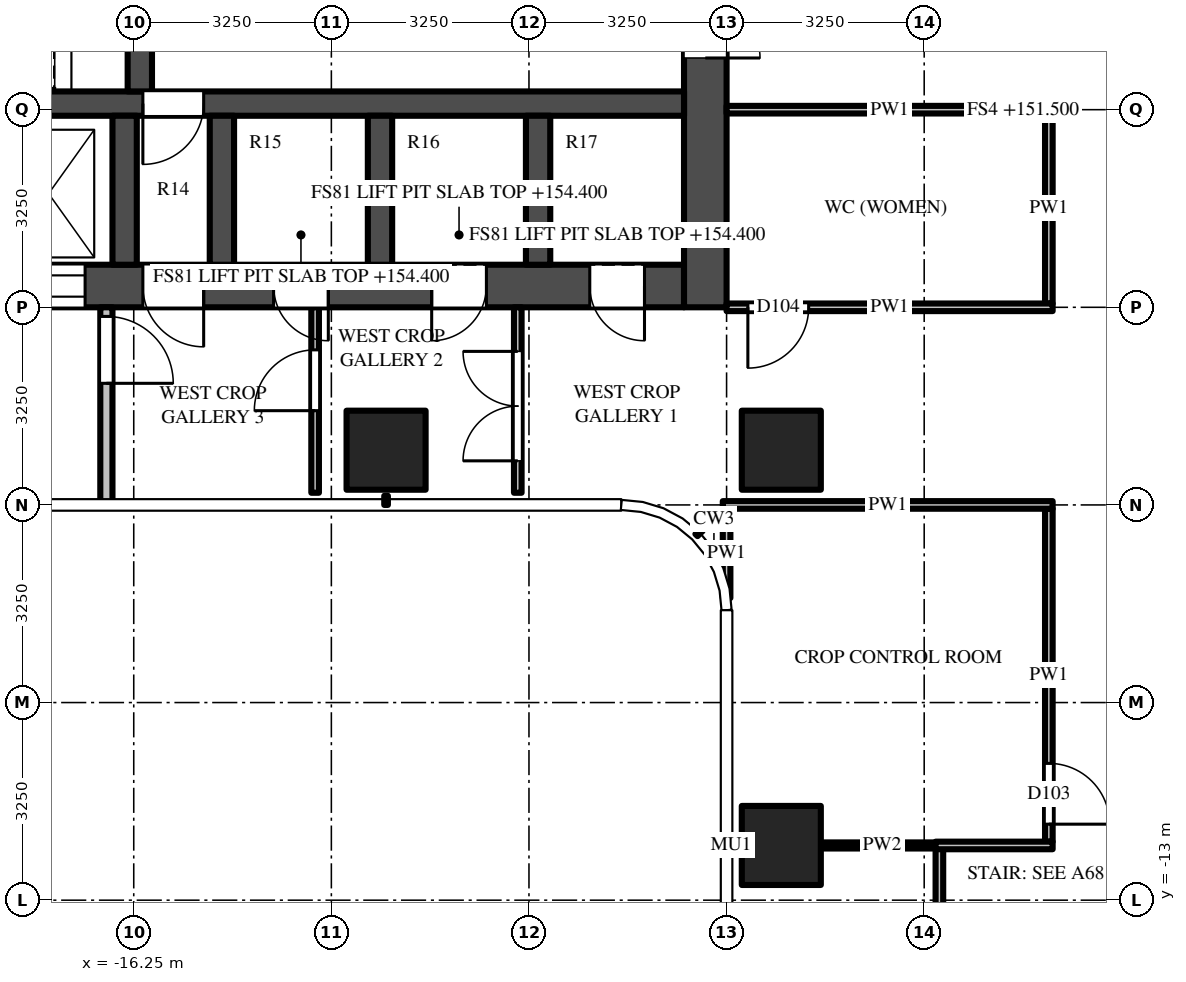
"""IFC4 building model, lengths in metres.
Left out: names, types, materials, properties, quantities, classifications, styles, units other than length and angle.
Written with IfcOpenShell. Run it as: python <this file> out.ifc"""

import sys

from ifc_helpers import new_model, si_unit, direction, frame, frame_2d, origin, origin_2d, place, context, subcontext, project, spatial, rectangle, extrude, source, transform, mapped, element, fill, save


model = new_model("IFC4")
c1 = context("Model", 3, precision=1e-05, world=origin(), true_north=direction((0.0, 1.0)))
c2 = subcontext(c1, "Body", "Model", "MODEL_VIEW")
j1 = project(units=[si_unit("LENGTHUNIT", "METRE"), si_unit("PLANEANGLEUNIT", "RADIAN")], contexts=[c1])
p1 = place(None, origin())
s1 = spatial("IfcSite", under=j1, at=p1, CompositionType="ELEMENT")
p2 = place(p1, origin())
s2 = spatial("IfcBuilding", under=s1, at=p2, CompositionType="ELEMENT")
p3 = place(p2, frame((0.0, 0.0, 151.5)))
s3 = spatial("IfcBuildingStorey", under=s2, at=p3, CompositionType="ELEMENT", Elevation=151.5)
m1 = source(origin(), c2, "Body", "SweptSolid", [
    extrude(rectangle(XDim=1.3, YDim=1.3, at=origin_2d()), origin(), (0.0, 0.0, 1.0), 4.5),
])
for number, where, z_axis, x_axis in (
    (1, (-5.6, -5.6, 0.0), (0.0, 0.0, 1.0), (1.0, 0.0, 0.0)),
    (2, (-5.6, -12.1, 0.0), (0.0, 0.0, 1.0), (1.0, 0.0, 0.0)),
    (3, (-12.1, -5.6, 0.0), (0.0, 0.0, 1.0), (1.0, 0.0, 0.0)),
):
    element("IfcColumn", number, at=place(p3, frame(where, z_axis=z_axis, x_axis=x_axis)), inside=s3, PredefinedType="COLUMN", context=c2, shape_type="MappedRepresentation", body=[
        mapped(m1, transform((0.0, 0.0, 0.0))),
    ])
m2 = source(origin(), c2, "Body", "SweptSolid", [
    extrude(rectangle(XDim=14.85, YDim=0.7, at=frame_2d((7.425, 0.0))), origin(), (0.0, 0.0, 1.0), 4.15),
])
p4 = place(p3, frame((-7.2, -2.9, 0.0), z_axis=(0.0, 0.0, 1.0), x_axis=(-1.0, 0.0, 0.0)))
e4 = element("IfcWall", 4, at=p4, inside=s3, PredefinedType="SHEAR", context=c2, shape_type="MappedRepresentation", body=[
    mapped(m2, transform((0.0, 0.0, 0.0))),
])
m3 = source(origin(), c2, "Body", "SweptSolid", [
    extrude(rectangle(XDim=1.3, YDim=2.1, at=frame_2d((0.65, 1.05))), frame((0.0, 0.36, 0.0), z_axis=(0.0, -1.0, 0.0), x_axis=(1.0, 0.0, 0.0)), (0.0, 0.0, 1.0), 0.72),
])
p5 = place(p4, frame((12.2, 0.0, 0.0)))
e5 = element("IfcOpeningElement", 5, at=p5, cuts=e4, PredefinedType="OPENING", context=c2, shape_type="MappedRepresentation", body=[
    mapped(m3, transform((0.0, 0.0, 0.0))),
])
m4 = source(origin(), c2, "Body", "SweptSolid", [
    extrude(rectangle(XDim=1.2, YDim=2.1, at=frame_2d((0.6, 1.05))), frame((0.0, 0.36, 0.0), z_axis=(0.0, -1.0, 0.0), x_axis=(1.0, 0.0, 0.0)), (0.0, 0.0, 1.0), 0.72),
])
p6 = place(p4, frame((9.85, 0.0, 0.0)))
e6 = element("IfcOpeningElement", 6, at=p6, cuts=e4, PredefinedType="OPENING", context=c2, shape_type="MappedRepresentation", body=[
    mapped(m4, transform((0.0, 0.0, 0.0))),
])
m5 = source(origin(), c2, "Body", "SweptSolid", [
    extrude(rectangle(XDim=1.0, YDim=2.1, at=frame_2d((0.5, 1.05))), frame((0.0, 0.36, 0.0), z_axis=(0.0, -1.0, 0.0), x_axis=(1.0, 0.0, 0.0)), (0.0, 0.0, 1.0), 0.72),
])
p7 = place(p4, frame((7.9, 0.0, 0.0)))
e7 = element("IfcOpeningElement", 7, at=p7, cuts=e4, PredefinedType="OPENING", context=c2, shape_type="MappedRepresentation", body=[
    mapped(m5, transform((0.0, 0.0, 0.0))),
])
m6 = source(origin(), c2, "Body", "SweptSolid", [
    extrude(rectangle(XDim=0.9, YDim=2.1, at=frame_2d((0.45, 1.05))), frame((0.0, 0.36, 0.0), z_axis=(0.0, -1.0, 0.0), x_axis=(1.0, 0.0, 0.0)), (0.0, 0.0, 1.0), 0.72),
])
p8 = place(p4, frame((0.65, 0.0, 0.0)))
e8 = element("IfcOpeningElement", 8, at=p8, cuts=e4, PredefinedType="OPENING", context=c2, shape_type="MappedRepresentation", body=[
    mapped(m6, transform((0.0, 0.0, 0.0))),
])
p9 = place(p4, frame((3.25, 0.0, 0.0)))
e9 = element("IfcOpeningElement", 9, at=p9, cuts=e4, PredefinedType="OPENING", context=c2, shape_type="MappedRepresentation", body=[
    mapped(m6, transform((0.0, 0.0, 0.0))),
])
p10 = place(p4, frame((5.85, 0.0, 0.0)))
e10 = element("IfcOpeningElement", 10, at=p10, cuts=e4, PredefinedType="OPENING", context=c2, shape_type="MappedRepresentation", body=[
    mapped(m6, transform((0.0, 0.0, 0.0))),
])
m7 = source(origin(), c2, "Body", "SweptSolid", [
    extrude(rectangle(XDim=9.05, YDim=0.7, at=frame_2d((4.525, 0.0))), origin(), (0.0, 0.0, 1.0), 4.15),
])
p11 = place(p3, frame((-6.85, 5.8, 0.0), z_axis=(0.0, 0.0, 1.0), x_axis=(0.0, -1.0, 0.0)))
e11 = element("IfcWall", 11, at=p11, inside=s3, PredefinedType="SHEAR", context=c2, shape_type="MappedRepresentation", body=[
    mapped(m7, transform((0.0, 0.0, 0.0))),
])
m8 = source(origin(), c2, "Body", "SweptSolid", [
    extrude(rectangle(XDim=1.8, YDim=2.1, at=frame_2d((0.9, 1.05))), frame((0.0, 0.36, 0.0), z_axis=(0.0, -1.0, 0.0), x_axis=(1.0, 0.0, 0.0)), (0.0, 0.0, 1.0), 0.72),
])
p12 = place(p11, frame((3.15, 0.0, 0.0)))
e12 = element("IfcOpeningElement", 12, at=p12, cuts=e11, PredefinedType="OPENING", context=c2, shape_type="MappedRepresentation", body=[
    mapped(m8, transform((0.0, 0.0, 0.0))),
])
m9 = source(origin(), c2, "Body", "SweptSolid", [
    extrude(rectangle(XDim=14.85, YDim=0.4, at=frame_2d((7.425, 0.0))), origin(), (0.0, 0.0, 1.0), 4.15),
])
p13 = place(p3, frame((-7.2, 0.1, 0.0), z_axis=(0.0, 0.0, 1.0), x_axis=(-1.0, 0.0, 0.0)))
e13 = element("IfcWall", 13, at=p13, inside=s3, PredefinedType="SHEAR", context=c2, shape_type="MappedRepresentation", body=[
    mapped(m9, transform((0.0, 0.0, 0.0))),
])
m10 = source(origin(), c2, "Body", "SweptSolid", [
    extrude(rectangle(XDim=1.0, YDim=2.1, at=frame_2d((0.5, 1.05))), frame((0.0, 0.21, 0.0), z_axis=(0.0, -1.0, 0.0), x_axis=(1.0, 0.0, 0.0)), (0.0, 0.0, 1.0), 0.42),
])
p14 = place(p13, frame((7.9, 0.0, 0.0)))
e14 = element("IfcOpeningElement", 14, at=p14, cuts=e13, PredefinedType="OPENING", context=c2, shape_type="MappedRepresentation", body=[
    mapped(m10, transform((0.0, 0.0, 0.0))),
])
m11 = source(origin(), c2, "Body", "SweptSolid", [
    extrude(rectangle(XDim=5.5, YDim=0.4, at=frame_2d((2.75, 0.0))), origin(), (0.0, 0.0, 1.0), 4.15),
])
p15 = place(p3, frame((-16.15, 5.8, 0.0), z_axis=(0.0, 0.0, 1.0), x_axis=(0.0, -1.0, 0.0)))
e15 = element("IfcWall", 15, at=p15, inside=s3, PredefinedType="SHEAR", context=c2, shape_type="MappedRepresentation", body=[
    mapped(m11, transform((0.0, 0.0, 0.0))),
])
m12 = source(origin(), c2, "Body", "SweptSolid", [
    extrude(rectangle(XDim=1.1, YDim=2.1, at=frame_2d((0.55, 1.05))), frame((0.0, 0.21, 0.0), z_axis=(0.0, -1.0, 0.0), x_axis=(1.0, 0.0, 0.0)), (0.0, 0.0, 1.0), 0.42),
])
p16 = place(p15, frame((0.725, 0.0, 0.0)))
e16 = element("IfcOpeningElement", 16, at=p16, cuts=e15, PredefinedType="OPENING", context=c2, shape_type="MappedRepresentation", body=[
    mapped(m12, transform((0.0, 0.0, 0.0))),
])
p17 = place(p15, frame((3.675, 0.0, 0.0)))
e17 = element("IfcOpeningElement", 17, at=p17, cuts=e15, PredefinedType="OPENING", context=c2, shape_type="MappedRepresentation", body=[
    mapped(m12, transform((0.0, 0.0, 0.0))),
])
m13 = source(origin(), c2, "Body", "SweptSolid", [
    extrude(rectangle(XDim=2.45, YDim=0.4, at=frame_2d((1.225, 0.0))), origin(), (0.0, 0.0, 1.0), 4.15),
])
for number, where, z_axis, x_axis in (
    (18, (-9.6, -0.1, 0.0), (0.0, 0.0, 1.0), (0.0, -1.0, 0.0)),
    (19, (-12.2, -0.1, 0.0), (0.0, 0.0, 1.0), (0.0, -1.0, 0.0)),
    (20, (-14.8, -0.1, 0.0), (0.0, 0.0, 1.0), (0.0, -1.0, 0.0)),
    (21, (-16.4, -0.1, 0.0), (0.0, 0.0, 1.0), (0.0, -1.0, 0.0)),
):
    element("IfcWall", number, at=place(p3, frame(where, z_axis=z_axis, x_axis=x_axis)), inside=s3, PredefinedType="SHEAR", context=c2, shape_type="MappedRepresentation", body=[
        mapped(m13, transform((0.0, 0.0, 0.0))),
    ])
m14 = source(origin(), c2, "Body", "SweptSolid", [
    extrude(rectangle(XDim=3.25, YDim=0.2, at=frame_2d((1.625, 0.0))), origin(), (0.0, 0.0, 1.0), 4.15),
])
p18 = place(p3, frame((-16.7, -3.25, 0.0), z_axis=(0.0, 0.0, 1.0), x_axis=(0.0, -1.0, 0.0)))
e22 = element("IfcWall", 22, at=p18, inside=s3, PredefinedType="PARTITIONING", context=c2, shape_type="MappedRepresentation", body=[
    mapped(m14, transform((0.0, 0.0, 0.0))),
])
m15 = source(origin(), c2, "Body", "SweptSolid", [
    extrude(rectangle(XDim=1.1, YDim=2.1, at=frame_2d((0.55, 1.05))), frame((0.0, 0.11, 0.0), z_axis=(0.0, -1.0, 0.0), x_axis=(1.0, 0.0, 0.0)), (0.0, 0.0, 1.0), 0.22),
])
p19 = place(p18, frame((0.15, 0.0, 0.0)))
e23 = element("IfcOpeningElement", 23, at=p19, cuts=e22, PredefinedType="OPENING", context=c2, shape_type="MappedRepresentation", body=[
    mapped(m15, transform((0.0, 0.0, 0.0))),
])
m16 = source(origin(), c2, "Body", "SweptSolid", [
    extrude(rectangle(XDim=3.05, YDim=0.125, at=frame_2d((1.525, 0.0))), origin(), (0.0, 0.0, 1.0), 3.23),
])
p20 = place(p3, frame((-13.267, -6.3, 0.0), z_axis=(0.0, 0.0, 1.0), x_axis=(0.0, 1.0, 0.0)))
e24 = element("IfcWall", 24, at=p20, inside=s3, PredefinedType="PARTITIONING", context=c2, shape_type="MappedRepresentation", body=[
    mapped(m16, transform((0.0, 0.0, 0.0))),
])
m17 = source(origin(), c2, "Body", "SweptSolid", [
    extrude(rectangle(XDim=1.0, YDim=2.1, at=frame_2d((0.5, 1.05))), frame((0.0, 0.073, 0.0), z_axis=(0.0, -1.0, 0.0), x_axis=(1.0, 0.0, 0.0)), (0.0, 0.0, 1.0), 0.145),
])
p21 = place(p20, frame((1.35, 0.0, 0.0)))
e25 = element("IfcOpeningElement", 25, at=p21, cuts=e24, PredefinedType="OPENING", context=c2, shape_type="MappedRepresentation", body=[
    mapped(m17, transform((0.0, 0.0, 0.0))),
])
p22 = place(p3, frame((-9.934, -6.3, 0.0), z_axis=(0.0, 0.0, 1.0), x_axis=(0.0, 1.0, 0.0)))
e26 = element("IfcWall", 26, at=p22, inside=s3, PredefinedType="PARTITIONING", context=c2, shape_type="MappedRepresentation", body=[
    mapped(m16, transform((0.0, 0.0, 0.0))),
])
m18 = source(origin(), c2, "Body", "SweptSolid", [
    extrude(rectangle(XDim=1.8, YDim=2.1, at=frame_2d((0.9, 1.05))), frame((0.0, 0.073, 0.0), z_axis=(0.0, -1.0, 0.0), x_axis=(1.0, 0.0, 0.0)), (0.0, 0.0, 1.0), 0.145),
])
p23 = place(p22, frame((0.525, 0.0, 0.0)))
e27 = element("IfcOpeningElement", 27, at=p23, cuts=e26, PredefinedType="OPENING", context=c2, shape_type="MappedRepresentation", body=[
    mapped(m18, transform((0.0, 0.0, 0.0))),
])
m19 = source(origin(), c2, "Body", "SweptSolid", [
    extrude(rectangle(XDim=1.469, YDim=0.125, at=frame_2d((0.734, 0.0))), origin(), (0.0, 0.0, 1.0), 4.15),
])
p24 = place(p3, frame((-6.5, -6.562, 0.0), z_axis=(0.0, 0.0, 1.0), x_axis=(0.0, -1.0, 0.0)))
e28 = element("IfcWall", 28, at=p24, inside=s3, PredefinedType="PARTITIONING", context=c2, shape_type="MappedRepresentation", body=[
    mapped(m19, transform((0.0, 0.0, 0.0))),
])
m20 = source(origin(), c2, "Body", "SweptSolid", [
    extrude(rectangle(XDim=8.788, YDim=0.125, at=frame_2d((4.394, 0.0))), origin(), (0.0, 0.0, 1.0), 3.368),
])
p25 = place(p3, frame((-3.0, -20.938, 0.0), z_axis=(0.0, 0.0, 1.0), x_axis=(0.0, 1.0, 0.0)))
e29 = element("IfcWall", 29, at=p25, inside=s3, PredefinedType="PARTITIONING", context=c2, shape_type="MappedRepresentation", body=[
    mapped(m20, transform((0.0, 0.0, 0.0))),
])
p26 = place(p25, frame((6.087, 0.0, 0.0)))
e30 = element("IfcOpeningElement", 30, at=p26, cuts=e29, PredefinedType="OPENING", context=c2, shape_type="MappedRepresentation", body=[
    mapped(m17, transform((0.0, 0.0, 0.0))),
])
m21 = source(origin(), c2, "Body", "SweptSolid", [
    extrude(rectangle(XDim=5.475, YDim=0.125, at=frame_2d((2.738, 0.0))), origin(), (0.0, 0.0, 1.0), 3.368),
])
p27 = place(p3, frame((-1.2, -6.562, 0.0), z_axis=(0.0, 0.0, 1.0), x_axis=(0.0, -1.0, 0.0)))
e31 = element("IfcWall", 31, at=p27, inside=s3, PredefinedType="PARTITIONING", context=c2, shape_type="MappedRepresentation", body=[
    mapped(m21, transform((0.0, 0.0, 0.0))),
])
p28 = place(p27, frame((4.188, 0.0, 0.0)))
e32 = element("IfcOpeningElement", 32, at=p28, cuts=e31, PredefinedType="OPENING", context=c2, shape_type="MappedRepresentation", body=[
    mapped(m17, transform((0.0, 0.0, 0.0))),
])
m22 = source(origin(), c2, "Body", "SweptSolid", [
    extrude(rectangle(XDim=3.125, YDim=0.125, at=frame_2d((1.562, 0.0))), origin(), (0.0, 0.0, 1.0), 3.447),
])
p29 = place(p3, frame((-1.2, -0.062, 0.0), z_axis=(0.0, 0.0, 1.0), x_axis=(0.0, -1.0, 0.0)))
e33 = element("IfcWall", 33, at=p29, inside=s3, PredefinedType="PARTITIONING", context=c2, shape_type="MappedRepresentation", body=[
    mapped(m22, transform((0.0, 0.0, 0.0))),
])
m23 = source(origin(), c2, "Body", "SweptSolid", [
    extrude(rectangle(XDim=2.012, YDim=0.1, at=frame_2d((1.006, 0.0))), origin(), (0.0, 0.0, 1.0), 3.368),
])
p30 = place(p3, frame((-4.95, -12.1, 0.0), z_axis=(0.0, 0.0, 1.0), x_axis=(1.0, 0.0, 0.0)))
e34 = element("IfcWall", 34, at=p30, inside=s3, PredefinedType="PARTITIONING", context=c2, shape_type="MappedRepresentation", body=[
    mapped(m23, transform((0.0, 0.0, 0.0))),
])
m24 = source(origin(), c2, "Body", "SweptSolid", [
    extrude(rectangle(XDim=1.925, YDim=0.125, at=frame_2d((0.962, 0.0))), origin(), (0.0, 0.0, 1.0), 3.368),
])
p31 = place(p3, frame((-3.062, -12.1, 0.0), z_axis=(0.0, 0.0, 1.0), x_axis=(1.0, 0.0, 0.0)))
e35 = element("IfcWall", 35, at=p31, inside=s3, PredefinedType="PARTITIONING", context=c2, shape_type="MappedRepresentation", body=[
    mapped(m24, transform((0.0, 0.0, 0.0))),
])
m25 = source(origin(), c2, "Body", "SweptSolid", [
    extrude(rectangle(XDim=5.425, YDim=0.125, at=frame_2d((2.712, 0.0))), origin(), (0.0, 0.0, 1.0), 3.23),
])
p32 = place(p3, frame((-1.137, -6.5, 0.0), z_axis=(0.0, 0.0, 1.0), x_axis=(-1.0, 0.0, 0.0)))
e36 = element("IfcWall", 36, at=p32, inside=s3, PredefinedType="PARTITIONING", context=c2, shape_type="MappedRepresentation", body=[
    mapped(m25, transform((0.0, 0.0, 0.0))),
])
m26 = source(origin(), c2, "Body", "SweptSolid", [
    extrude(rectangle(XDim=5.363, YDim=0.125, at=frame_2d((2.681, 0.0))), origin(), (0.0, 0.0, 1.0), 3.368),
])
p33 = place(p3, frame((-1.137, -3.25, 0.0), z_axis=(0.0, 0.0, 1.0), x_axis=(-1.0, 0.0, 0.0)))
e37 = element("IfcWall", 37, at=p33, inside=s3, PredefinedType="PARTITIONING", context=c2, shape_type="MappedRepresentation", body=[
    mapped(m26, transform((0.0, 0.0, 0.0))),
])
p34 = place(p33, frame((4.012, 0.0, 0.0)))
e38 = element("IfcOpeningElement", 38, at=p34, cuts=e37, PredefinedType="OPENING", context=c2, shape_type="MappedRepresentation", body=[
    mapped(m17, transform((0.0, 0.0, 0.0))),
])
p35 = place(p3, frame((-1.137, 0.0, 0.0), z_axis=(0.0, 0.0, 1.0), x_axis=(-1.0, 0.0, 0.0)))
e39 = element("IfcWall", 39, at=p35, inside=s3, PredefinedType="PARTITIONING", context=c2, shape_type="MappedRepresentation", body=[
    mapped(m26, transform((0.0, 0.0, 0.0))),
])
m27 = source(origin(), c2, "Body", "SweptSolid", [
    extrude(rectangle(XDim=1.2, YDim=2.1, at=frame_2d((0.6, 1.05))), frame((0.0, -0.275, 0.0), z_axis=(0.0, -1.0, 0.0), x_axis=(1.0, 0.0, 0.0)), (0.0, 0.0, 1.0), 0.05),
])
p36 = place(p6, origin())
e40 = element("IfcDoor", 40, at=p36, inside=s3, OperationType="DOUBLE_DOOR_SLIDING", PredefinedType="DOOR", context=c2, shape_type="MappedRepresentation", body=[
    mapped(m27, transform((0.0, 0.0, 0.0))),
])
fill(e6, e40)
m28 = source(origin(), c2, "Body", "SweptSolid", [
    extrude(rectangle(XDim=1.8, YDim=2.1, at=frame_2d((0.9, 1.05))), frame((0.0, -0.275, 0.0), z_axis=(0.0, -1.0, 0.0), x_axis=(1.0, 0.0, 0.0)), (0.0, 0.0, 1.0), 0.05),
])
p37 = place(p12, origin())
e41 = element("IfcDoor", 41, at=p37, inside=s3, OperationType="DOUBLE_DOOR_SINGLE_SWING", PredefinedType="DOOR", context=c2, shape_type="MappedRepresentation", body=[
    mapped(m28, transform((0.0, 0.0, 0.0))),
])
fill(e12, e41)
m29 = source(origin(), c2, "Body", "SweptSolid", [
    extrude(rectangle(XDim=1.0, YDim=2.1, at=frame_2d((0.5, 1.05))), frame((0.0, 0.025, 0.0), z_axis=(0.0, -1.0, 0.0), x_axis=(1.0, 0.0, 0.0)), (0.0, 0.0, 1.0), 0.05),
])
p38 = place(p14, origin())
e42 = element("IfcDoor", 42, at=p38, inside=s3, OperationType="SINGLE_SWING_RIGHT", PredefinedType="DOOR", context=c2, shape_type="MappedRepresentation", body=[
    mapped(m29, transform((0.0, 0.0, 0.0))),
])
fill(e14, e42)
m30 = source(origin(), c2, "Body", "SweptSolid", [
    extrude(rectangle(XDim=1.0, YDim=2.1, at=frame_2d((0.5, 1.05))), frame((0.0, -0.275, 0.0), z_axis=(0.0, -1.0, 0.0), x_axis=(1.0, 0.0, 0.0)), (0.0, 0.0, 1.0), 0.05),
])
p39 = place(p7, origin())
e43 = element("IfcDoor", 43, at=p39, inside=s3, OperationType="SINGLE_SWING_LEFT", PredefinedType="DOOR", context=c2, shape_type="MappedRepresentation", body=[
    mapped(m30, transform((0.0, 0.0, 0.0))),
])
fill(e7, e43)
m31 = source(origin(), c2, "Body", "SweptSolid", [
    extrude(rectangle(XDim=1.1, YDim=2.1, at=frame_2d((0.55, 1.05))), frame((0.0, 0.025, 0.0), z_axis=(0.0, -1.0, 0.0), x_axis=(1.0, 0.0, 0.0)), (0.0, 0.0, 1.0), 0.05),
])
p40 = place(p19, origin())
e44 = element("IfcDoor", 44, at=p40, inside=s3, OperationType="SINGLE_SWING_RIGHT", PredefinedType="DOOR", context=c2, shape_type="MappedRepresentation", body=[
    mapped(m31, transform((0.0, 0.0, 0.0))),
])
fill(e23, e44)
m32 = source(origin(), c2, "Body", "SweptSolid", [
    extrude(rectangle(XDim=0.9, YDim=2.1, at=frame_2d((0.45, 1.05))), frame((0.0, -0.275, 0.0), z_axis=(0.0, -1.0, 0.0), x_axis=(1.0, 0.0, 0.0)), (0.0, 0.0, 1.0), 0.05),
])
p41 = place(p8, origin())
e45 = element("IfcDoor", 45, at=p41, inside=s3, OperationType="SINGLE_SWING_LEFT", PredefinedType="DOOR", context=c2, shape_type="MappedRepresentation", body=[
    mapped(m32, transform((0.0, 0.0, 0.0))),
])
fill(e8, e45)
p42 = place(p9, origin())
e46 = element("IfcDoor", 46, at=p42, inside=s3, OperationType="SINGLE_SWING_RIGHT", PredefinedType="DOOR", context=c2, shape_type="MappedRepresentation", body=[
    mapped(m32, transform((0.0, 0.0, 0.0))),
])
fill(e9, e46)
p43 = place(p10, origin())
e47 = element("IfcDoor", 47, at=p43, inside=s3, OperationType="SINGLE_SWING_LEFT", PredefinedType="DOOR", context=c2, shape_type="MappedRepresentation", body=[
    mapped(m32, transform((0.0, 0.0, 0.0))),
])
fill(e10, e47)
p44 = place(p28, origin())
e48 = element("IfcDoor", 48, at=p44, inside=s3, OperationType="SINGLE_SWING_RIGHT", PredefinedType="DOOR", context=c2, shape_type="MappedRepresentation", body=[
    mapped(m29, transform((0.0, 0.0, 0.0))),
])
fill(e32, e48)
m33 = source(origin(), c2, "Body", "SweptSolid", [
    extrude(rectangle(XDim=1.8, YDim=2.1, at=frame_2d((0.9, 1.05))), frame((0.0, 0.025, 0.0), z_axis=(0.0, -1.0, 0.0), x_axis=(1.0, 0.0, 0.0)), (0.0, 0.0, 1.0), 0.05),
])
p45 = place(p23, origin())
e49 = element("IfcDoor", 49, at=p45, inside=s3, OperationType="DOUBLE_DOOR_SINGLE_SWING", PredefinedType="DOOR", context=c2, shape_type="MappedRepresentation", body=[
    mapped(m33, transform((0.0, 0.0, 0.0))),
])
fill(e27, e49)
p46 = place(p21, origin())
e50 = element("IfcDoor", 50, at=p46, inside=s3, OperationType="SINGLE_SWING_LEFT", PredefinedType="DOOR", context=c2, shape_type="MappedRepresentation", body=[
    mapped(m29, transform((0.0, 0.0, 0.0))),
])
fill(e25, e50)
p47 = place(p34, origin())
e51 = element("IfcDoor", 51, at=p47, inside=s3, OperationType="SINGLE_SWING_RIGHT", PredefinedType="DOOR", context=c2, shape_type="MappedRepresentation", body=[
    mapped(m29, transform((0.0, 0.0, 0.0))),
])
fill(e38, e51)
save(model, sys.argv[1])
